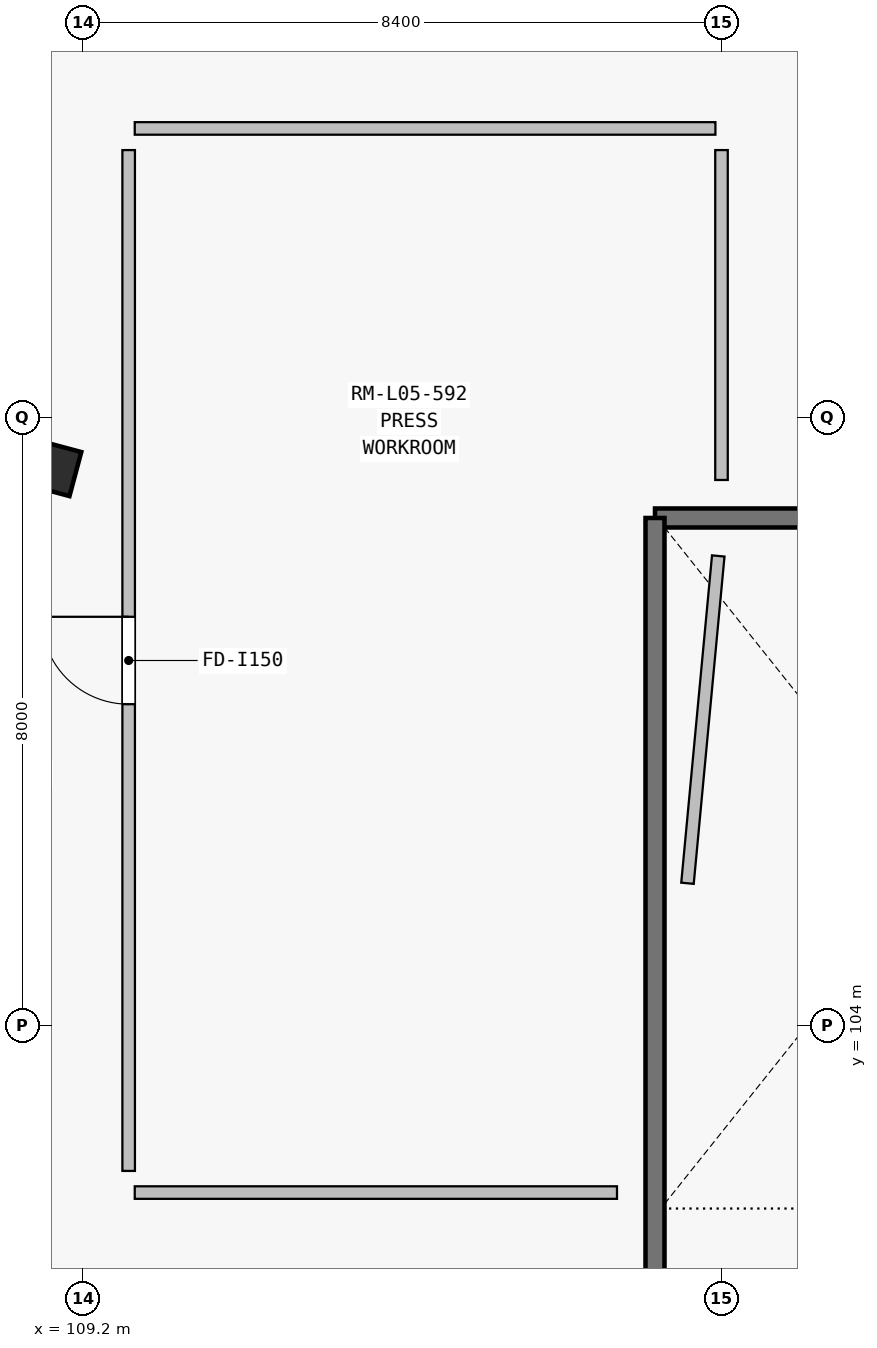
"""IFC4 building model, lengths in metres.
Left out: names, types, materials, properties, quantities, classifications, styles, units other than length and angle.
Written with IfcOpenShell. Run it as: python <this file> out.ifc"""

import sys

from ifc_helpers import new_model, si_unit, direction, frame, frame_2d, origin, origin_2d, place, context, subcontext, project, spatial, rectangle, extrude, element, fill, save


model = new_model("IFC4")
c1 = context("Model", 3, precision=1e-05, world=origin(), true_north=direction((0.0, 1.0)))
c2 = subcontext(c1, "Body", "Model", "MODEL_VIEW")
j1 = project(units=[si_unit("LENGTHUNIT", "METRE"), si_unit("PLANEANGLEUNIT", "RADIAN")], contexts=[c1])
p1 = place(None, origin())
s1 = spatial("IfcSite", under=j1, at=p1, CompositionType="ELEMENT")
p2 = place(p1, origin())
s2 = spatial("IfcBuilding", under=s1, at=p2, CompositionType="ELEMENT")
p3 = place(p2, frame((0.0, 0.0, 23.4)))
s3 = spatial("IfcBuildingStorey", under=s2, at=p3, CompositionType="ELEMENT", Elevation=23.4)
p4 = place(p3, frame((108.809, 111.33, 0.0), z_axis=(0.0, 0.0, 1.0), x_axis=(0.258819045103, 0.965925826289, 0.0)))
e1 = element("IfcColumn", 1, at=p4, inside=s3, PredefinedType="COLUMN", context=c2, shape_type="SweptSolid", body=[
    extrude(rectangle(XDim=0.6, YDim=0.6, at=origin_2d()), origin(), (0.0, 0.0, 1.0), 3.15),
])
p5 = place(p3, frame((110.951, 119.56, 0.0), z_axis=(0.0, 0.0, 1.0), x_axis=(0.949760483421, -0.312977673536, 0.0)))
e2 = element("IfcWall", 2, at=p5, inside=s3, PredefinedType="SOLIDWALL", context=c2, shape_type="SweptSolid", body=[
    extrude(rectangle(XDim=18.693, YDim=0.265, at=frame_2d((9.346, 0.0))), origin(), (0.0, 0.0, 1.0), 3.18),
])
p6 = place(p5, frame((7.05, 0.0, 0.9)))
e3 = element("IfcOpeningElement", 3, at=p6, cuts=e2, PredefinedType="OPENING", context=c2, shape_type="SweptSolid", body=[
    extrude(rectangle(XDim=1.6, YDim=1.45, at=frame_2d((0.8, 0.725))), frame((0.0, 0.142, 0.0), z_axis=(0.0, -1.0, 0.0), x_axis=(1.0, 0.0, 0.0)), (0.0, 0.0, 1.0), 0.285),
])
p7 = place(p3, frame((116.725, 110.675, 0.0), z_axis=(0.0, 0.0, 1.0), x_axis=(1.0, 0.0, 0.0)))
e4 = element("IfcWall", 4, at=p7, inside=s3, PredefinedType="SHEAR", context=c2, shape_type="SweptSolid", body=[
    extrude(rectangle(XDim=7.35, YDim=0.25, at=frame_2d((3.675, 0.0))), origin(), (0.0, 0.0, 1.0), 3.08),
])
p8 = place(p3, frame((116.725, 97.925, 0.0), z_axis=(0.0, 0.0, 1.0), x_axis=(0.0, 1.0, 0.0)))
e5 = element("IfcWall", 5, at=p8, inside=s3, PredefinedType="SHEAR", context=c2, shape_type="SweptSolid", body=[
    extrude(rectangle(XDim=12.75, YDim=0.25, at=frame_2d((6.375, 0.0))), origin(), (0.0, 0.0, 1.0), 3.08),
])
p9 = place(p3, frame((109.88, 115.8, 0.0), z_axis=(0.0, 0.0, 1.0), x_axis=(1.0, 0.0, 0.0)))
e6 = element("IfcWall", 6, at=p9, inside=s3, PredefinedType="PARTITIONING", context=c2, shape_type="SweptSolid", body=[
    extrude(rectangle(XDim=7.64, YDim=0.165, at=frame_2d((3.82, 0.0))), origin(), (0.0, 0.0, 1.0), 3.18),
])
p10 = place(p3, frame((117.6, 115.515, 0.0), z_axis=(0.0, 0.0, 1.0), x_axis=(0.0, -1.0, 0.0)))
e7 = element("IfcWall", 7, at=p10, inside=s3, PredefinedType="PARTITIONING", context=c2, shape_type="SweptSolid", body=[
    extrude(rectangle(XDim=4.34, YDim=0.165, at=frame_2d((2.17, 0.0))), origin(), (0.0, 0.0, 1.0), 3.18),
])
p11 = place(p3, frame((117.557, 110.175, 0.0), z_axis=(0.0, 0.0, 1.0), x_axis=(-0.093589006701, -0.995610916887, 0.0)))
e8 = element("IfcWall", 8, at=p11, inside=s3, PredefinedType="PARTITIONING", context=c2, shape_type="SweptSolid", body=[
    extrude(rectangle(XDim=4.325, YDim=0.165, at=frame_2d((2.163, 0.0))), origin(), (0.0, 0.0, 1.0), 3.18),
])
p12 = place(p3, frame((116.225, 101.8, 0.0), z_axis=(0.0, 0.0, 1.0), x_axis=(-1.0, 0.0, 0.0)))
e9 = element("IfcWall", 9, at=p12, inside=s3, PredefinedType="PARTITIONING", context=c2, shape_type="SweptSolid", body=[
    extrude(rectangle(XDim=6.345, YDim=0.165, at=frame_2d((3.173, 0.0))), origin(), (0.0, 0.0, 1.0), 2.445),
])
p13 = place(p3, frame((109.8, 102.085, 0.0), z_axis=(0.0, 0.0, 1.0), x_axis=(0.0, 1.0, 0.0)))
e10 = element("IfcWall", 10, at=p13, inside=s3, PredefinedType="PARTITIONING", context=c2, shape_type="SweptSolid", body=[
    extrude(rectangle(XDim=13.43, YDim=0.165, at=frame_2d((6.715, 0.0))), origin(), (0.0, 0.0, 1.0), 2.445),
])
p14 = place(p13, frame((6.14, 0.0, 0.0)))
e11 = element("IfcOpeningElement", 11, at=p14, cuts=e10, PredefinedType="OPENING", context=c2, shape_type="SweptSolid", body=[
    extrude(rectangle(XDim=1.15, YDim=2.2, at=frame_2d((0.575, 1.1))), frame((0.0, 0.093, 0.0), z_axis=(0.0, -1.0, 0.0), x_axis=(1.0, 0.0, 0.0)), (0.0, 0.0, 1.0), 0.185),
])
p15 = place(p14, origin())
e12 = element("IfcDoor", 12, at=p15, inside=s3, OperationType="SINGLE_SWING_RIGHT", PredefinedType="DOOR", context=c2, shape_type="SweptSolid", body=[
    extrude(rectangle(XDim=1.15, YDim=2.2, at=frame_2d((0.575, 1.1))), frame((0.0, 0.025, 0.0), z_axis=(0.0, -1.0, 0.0), x_axis=(1.0, 0.0, 0.0)), (0.0, 0.0, 1.0), 0.05),
])
fill(e11, e12)
save(model, sys.argv[1])
